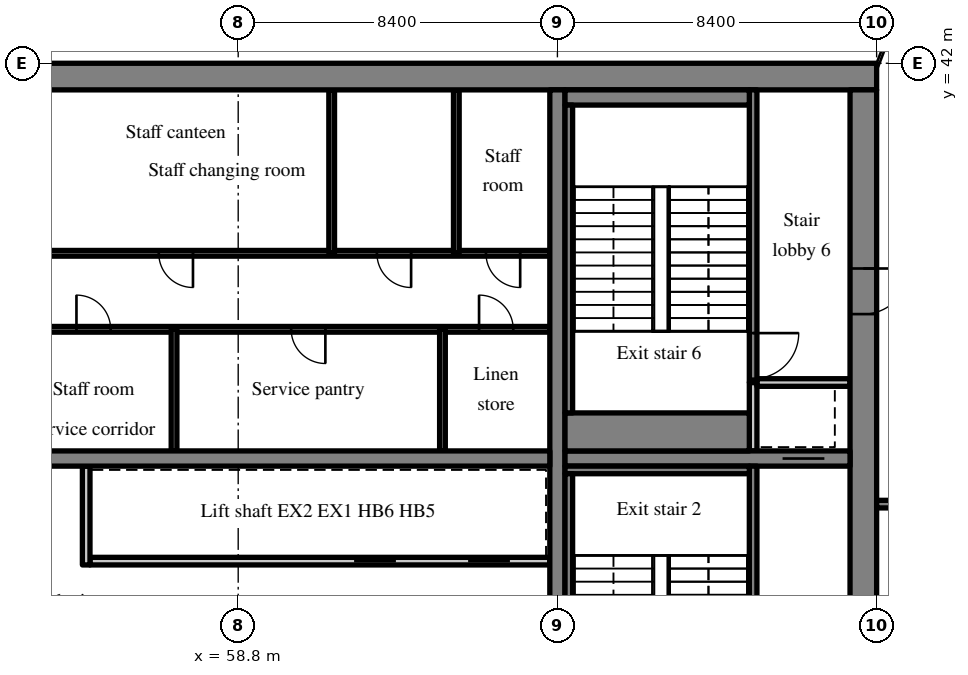
"""IFC4 building model, lengths in metres.
Left out: names, types, materials, properties, quantities, classifications, styles, units other than length and angle.
Written with IfcOpenShell. Run it as: python <this file> out.ifc"""

import sys

from ifc_helpers import new_model, si_unit, direction, frame, frame_2d, origin, place, context, subcontext, project, spatial, rectangle, extrude, source, transform, mapped, element, fill, save


model = new_model("IFC4")
c1 = context("Model", 3, precision=1e-05, world=origin(), true_north=direction((0.0, 1.0)))
c2 = subcontext(c1, "Body", "Model", "MODEL_VIEW")
j1 = project(units=[si_unit("LENGTHUNIT", "METRE"), si_unit("PLANEANGLEUNIT", "RADIAN")], contexts=[c1])
p1 = place(None, origin())
s1 = spatial("IfcSite", under=j1, at=p1, CompositionType="ELEMENT")
p2 = place(p1, origin())
s2 = spatial("IfcBuilding", under=s1, at=p2, CompositionType="ELEMENT")
p3 = place(p2, frame((0.0, 0.0, 170.6)))
s3 = spatial("IfcBuildingStorey", under=s2, at=p3, CompositionType="ELEMENT", Elevation=170.6)
m1 = source(origin(), c2, "Body", "SweptSolid", [
    extrude(rectangle(XDim=50.4, YDim=0.7, at=frame_2d((25.2, 0.0))), origin(), (0.0, 0.0, 1.0), 3.52),
])
p4 = place(p3, frame((25.2, 41.65, 0.0), z_axis=(0.0, 0.0, 1.0), x_axis=(1.0, 0.0, 0.0)))
e1 = element("IfcWall", 1, at=p4, inside=s3, PredefinedType="SHEAR", context=c2, shape_type="MappedRepresentation", body=[
    mapped(m1, transform((0.0, 0.0, 0.0), scale=1.0)),
])
m2 = source(origin(), c2, "Body", "SweptSolid", [
    extrude(rectangle(XDim=18.6, YDim=0.7, at=frame_2d((9.3, 0.0))), origin(), (0.0, 0.0, 1.0), 3.52),
])
p5 = place(p3, frame((75.25, 22.7, 0.0), z_axis=(0.0, 0.0, 1.0), x_axis=(0.0, 1.0, 0.0)))
e2 = element("IfcWall", 2, at=p5, inside=s3, PredefinedType="SHEAR", context=c2, shape_type="MappedRepresentation", body=[
    mapped(m2, transform((0.0, 0.0, 0.0), scale=1.0)),
])
m3 = source(origin(), c2, "Body", "SweptSolid", [
    extrude(rectangle(XDim=1.0, YDim=2.1, at=frame_2d((0.5, 1.05))), frame((0.0, 0.36, 0.0), z_axis=(0.0, -1.0, 0.0), x_axis=(1.0, 0.0, 0.0)), (0.0, 0.0, 1.0), 0.72),
])
p6 = place(p5, frame((2.8, 0.0, 0.0)))
e3 = element("IfcOpeningElement", 3, at=p6, cuts=e2, PredefinedType="OPENING", context=c2, shape_type="MappedRepresentation", body=[
    mapped(m3, transform((0.0, 0.0, 0.0), scale=1.0)),
])
m4 = source(origin(), c2, "Body", "SweptSolid", [
    extrude(rectangle(XDim=1.2, YDim=2.1, at=frame_2d((0.6, 1.05))), frame((0.0, 0.36, 0.0), z_axis=(0.0, -1.0, 0.0), x_axis=(1.0, 0.0, 0.0)), (0.0, 0.0, 1.0), 0.72),
])
p7 = place(p5, frame((12.7, 0.0, 0.0)))
e4 = element("IfcOpeningElement", 4, at=p7, cuts=e2, PredefinedType="OPENING", context=c2, shape_type="MappedRepresentation", body=[
    mapped(m4, transform((0.0, 0.0, 0.0), scale=1.0)),
])
m5 = source(origin(), c2, "Body", "SweptSolid", [
    extrude(rectangle(XDim=18.6, YDim=0.4, at=frame_2d((9.3, 0.0))), origin(), (0.0, 0.0, 1.0), 3.52),
])
p8 = place(p3, frame((67.2, 22.7, 0.0), z_axis=(0.0, 0.0, 1.0), x_axis=(0.0, 1.0, 0.0)))
e5 = element("IfcWall", 5, at=p8, inside=s3, PredefinedType="SHEAR", context=c2, shape_type="MappedRepresentation", body=[
    mapped(m5, transform((0.0, 0.0, 0.0), scale=1.0)),
])
m6 = source(origin(), c2, "Body", "SweptSolid", [
    extrude(rectangle(XDim=16.4, YDim=0.4, at=frame_2d((8.2, 0.0))), origin(), (0.0, 0.0, 1.0), 3.52),
])
p9 = place(p3, frame((50.6, 31.6, 0.0), z_axis=(0.0, 0.0, 1.0), x_axis=(1.0, 0.0, 0.0)))
e6 = element("IfcWall", 6, at=p9, inside=s3, PredefinedType="SHEAR", context=c2, shape_type="MappedRepresentation", body=[
    mapped(m6, transform((0.0, 0.0, 0.0), scale=1.0)),
])
m7 = source(origin(), c2, "Body", "SweptSolid", [
    extrude(rectangle(XDim=1.0, YDim=2.1, at=frame_2d((0.5, 1.05))), frame((0.0, 0.21, 0.0), z_axis=(0.0, -1.0, 0.0), x_axis=(1.0, 0.0, 0.0)), (0.0, 0.0, 1.0), 0.42),
])
p10 = place(p9, frame((0.6, 0.0, 0.0)))
e7 = element("IfcOpeningElement", 7, at=p10, cuts=e6, PredefinedType="OPENING", context=c2, shape_type="MappedRepresentation", body=[
    mapped(m7, transform((0.0, 0.0, 0.0), scale=1.0)),
])
m8 = source(origin(), c2, "Body", "SweptSolid", [
    extrude(rectangle(XDim=7.5, YDim=0.4, at=frame_2d((3.75, 0.0))), origin(), (0.0, 0.0, 1.0), 3.52),
])
p11 = place(p3, frame((67.4, 31.6, 0.0), z_axis=(0.0, 0.0, 1.0), x_axis=(1.0, 0.0, 0.0)))
e8 = element("IfcWall", 8, at=p11, inside=s3, PredefinedType="SHEAR", context=c2, shape_type="MappedRepresentation", body=[
    mapped(m8, transform((0.0, 0.0, 0.0), scale=1.0)),
])
m9 = source(origin(), c2, "Body", "SweptSolid", [
    extrude(rectangle(XDim=1.1, YDim=2.1, at=frame_2d((0.55, 1.05))), frame((0.0, 0.21, 0.0), z_axis=(0.0, -1.0, 0.0), x_axis=(1.0, 0.0, 0.0)), (0.0, 0.0, 1.0), 0.42),
])
p12 = place(p11, frame((5.725, 0.0, 0.0)))
e9 = element("IfcOpeningElement", 9, at=p12, cuts=e8, PredefinedType="OPENING", context=c2, shape_type="MappedRepresentation", body=[
    mapped(m9, transform((0.0, 0.0, 0.0), scale=1.0)),
])
m10 = source(origin(), c2, "Body", "SweptSolid", [
    extrude(rectangle(XDim=12.1, YDim=0.2, at=frame_2d((6.05, 0.0))), origin(), (0.0, 0.0, 1.0), 3.52),
])
p13 = place(p3, frame((67.0, 28.9, 0.0), z_axis=(0.0, 0.0, 1.0), x_axis=(-1.0, 0.0, 0.0)))
e10 = element("IfcWall", 10, at=p13, inside=s3, PredefinedType="SOLIDWALL", context=c2, shape_type="MappedRepresentation", body=[
    mapped(m10, transform((0.0, 0.0, 0.0), scale=1.0)),
])
m11 = source(origin(), c2, "Body", "SweptSolid", [
    extrude(rectangle(XDim=1.1, YDim=2.1, at=frame_2d((0.55, 1.05))), frame((0.0, 0.11, 0.0), z_axis=(0.0, -1.0, 0.0), x_axis=(1.0, 0.0, 0.0)), (0.0, 0.0, 1.0), 0.22),
])
p14 = place(p13, frame((1.05, 0.0, 0.0)))
e11 = element("IfcOpeningElement", 11, at=p14, cuts=e10, PredefinedType="OPENING", context=c2, shape_type="MappedRepresentation", body=[
    mapped(m11, transform((0.0, 0.0, 0.0), scale=1.0)),
])
p15 = place(p13, frame((4.05, 0.0, 0.0)))
e12 = element("IfcOpeningElement", 12, at=p15, cuts=e10, PredefinedType="OPENING", context=c2, shape_type="MappedRepresentation", body=[
    mapped(m11, transform((0.0, 0.0, 0.0), scale=1.0)),
])
m12 = source(origin(), c2, "Body", "SweptSolid", [
    extrude(rectangle(XDim=2.6, YDim=0.2, at=frame_2d((1.3, 0.0))), origin(), (0.0, 0.0, 1.0), 3.52),
])
p16 = place(p3, frame((54.8, 28.8, 0.0), z_axis=(0.0, 0.0, 1.0), x_axis=(0.0, 1.0, 0.0)))
e13 = element("IfcWall", 13, at=p16, inside=s3, PredefinedType="SOLIDWALL", context=c2, shape_type="MappedRepresentation", body=[
    mapped(m12, transform((0.0, 0.0, 0.0), scale=1.0)),
])
m13 = source(origin(), c2, "Body", "SweptSolid", [
    extrude(rectangle(XDim=14.2, YDim=0.15, at=frame_2d((7.1, 0.0))), origin(), (0.0, 0.0, 1.0), 3.52),
])
p17 = place(p3, frame((67.0, 35.0, 0.0), z_axis=(0.0, 0.0, 1.0), x_axis=(-1.0, 0.0, 0.0)))
e14 = element("IfcWall", 14, at=p17, inside=s3, PredefinedType="PARTITIONING", context=c2, shape_type="MappedRepresentation", body=[
    mapped(m13, transform((0.0, 0.0, 0.0), scale=1.0)),
])
m14 = source(origin(), c2, "Body", "SweptSolid", [
    extrude(rectangle(XDim=0.9, YDim=2.1, at=frame_2d((0.45, 1.05))), frame((0.0, 0.085, 0.0), z_axis=(0.0, -1.0, 0.0), x_axis=(1.0, 0.0, 0.0)), (0.0, 0.0, 1.0), 0.17),
])
p18 = place(p17, frame((0.962, 0.0, 0.0)))
e15 = element("IfcOpeningElement", 15, at=p18, cuts=e14, PredefinedType="OPENING", context=c2, shape_type="MappedRepresentation", body=[
    mapped(m14, transform((0.0, 0.0, 0.0), scale=1.0)),
])
p19 = place(p17, frame((5.906, 0.0, 0.0)))
e16 = element("IfcOpeningElement", 16, at=p19, cuts=e14, PredefinedType="OPENING", context=c2, shape_type="MappedRepresentation", body=[
    mapped(m14, transform((0.0, 0.0, 0.0), scale=1.0)),
])
p20 = place(p17, frame((11.556, 0.0, 0.0)))
e17 = element("IfcOpeningElement", 17, at=p20, cuts=e14, PredefinedType="OPENING", context=c2, shape_type="MappedRepresentation", body=[
    mapped(m14, transform((0.0, 0.0, 0.0), scale=1.0)),
])
m15 = source(origin(), c2, "Body", "SweptSolid", [
    extrude(rectangle(XDim=16.4, YDim=0.15, at=frame_2d((8.2, 0.0))), origin(), (0.0, 0.0, 1.0), 3.52),
])
p21 = place(p3, frame((67.0, 37.0, 0.0), z_axis=(0.0, 0.0, 1.0), x_axis=(-1.0, 0.0, 0.0)))
e18 = element("IfcWall", 18, at=p21, inside=s3, PredefinedType="PARTITIONING", context=c2, shape_type="MappedRepresentation", body=[
    mapped(m15, transform((0.0, 0.0, 0.0), scale=1.0)),
])
p22 = place(p21, frame((0.78, 0.0, 0.0)))
e19 = element("IfcOpeningElement", 19, at=p22, cuts=e18, PredefinedType="OPENING", context=c2, shape_type="MappedRepresentation", body=[
    mapped(m14, transform((0.0, 0.0, 0.0), scale=1.0)),
])
p23 = place(p21, frame((3.65, 0.0, 0.0)))
e20 = element("IfcOpeningElement", 20, at=p23, cuts=e18, PredefinedType="OPENING", context=c2, shape_type="MappedRepresentation", body=[
    mapped(m14, transform((0.0, 0.0, 0.0), scale=1.0)),
])
p24 = place(p21, frame((9.39, 0.0, 0.0)))
e21 = element("IfcOpeningElement", 21, at=p24, cuts=e18, PredefinedType="OPENING", context=c2, shape_type="MappedRepresentation", body=[
    mapped(m14, transform((0.0, 0.0, 0.0), scale=1.0)),
])
p25 = place(p21, frame((14.72, 0.0, 0.0)))
e22 = element("IfcOpeningElement", 22, at=p25, cuts=e18, PredefinedType="OPENING", context=c2, shape_type="MappedRepresentation", body=[
    mapped(m14, transform((0.0, 0.0, 0.0), scale=1.0)),
])
m16 = source(origin(), c2, "Body", "SweptSolid", [
    extrude(rectangle(XDim=3.2, YDim=0.15, at=frame_2d((1.6, 0.0))), origin(), (0.0, 0.0, 1.0), 3.52),
])
for number, where, z_axis, x_axis in (
    (23, (64.175, 31.8, 0.0), (0.0, 0.0, 1.0), (0.0, 1.0, 0.0)),
    (24, (57.112, 31.8, 0.0), (0.0, 0.0, 1.0), (0.0, 1.0, 0.0)),
):
    element("IfcWall", number, at=place(p3, frame(where, z_axis=z_axis, x_axis=x_axis)), inside=s3, PredefinedType="PARTITIONING", context=c2, shape_type="MappedRepresentation", body=[
        mapped(m16, transform((0.0, 0.0, 0.0), scale=1.0)),
    ])
m17 = source(origin(), c2, "Body", "SweptSolid", [
    extrude(rectangle(XDim=4.3, YDim=0.15, at=frame_2d((2.15, 0.0))), origin(), (0.0, 0.0, 1.0), 3.52),
])
for number, where, z_axis, x_axis in (
    (25, (64.54, 37.0, 0.0), (0.0, 0.0, 1.0), (0.0, 1.0, 0.0)),
    (26, (61.26, 37.0, 0.0), (0.0, 0.0, 1.0), (0.0, 1.0, 0.0)),
):
    element("IfcWall", number, at=place(p3, frame(where, z_axis=z_axis, x_axis=x_axis)), inside=s3, PredefinedType="PARTITIONING", context=c2, shape_type="MappedRepresentation", body=[
        mapped(m17, transform((0.0, 0.0, 0.0), scale=1.0)),
    ])
m18 = source(origin(), c2, "Body", "SweptSolid", [
    extrude(rectangle(XDim=8.7, YDim=0.2, at=frame_2d((4.35, 0.0))), origin(), (0.0, 0.0, 1.0), 3.52),
])
p26 = place(p3, frame((72.35, 22.7, 0.0), z_axis=(0.0, 0.0, 1.0), x_axis=(0.0, 1.0, 0.0)))
e27 = element("IfcWall", 27, at=p26, inside=s3, PredefinedType="SOLIDWALL", context=c2, shape_type="MappedRepresentation", body=[
    mapped(m18, transform((0.0, 0.0, 0.0), scale=1.0)),
])
m19 = source(origin(), c2, "Body", "SweptSolid", [
    extrude(rectangle(XDim=1.2, YDim=2.1, at=frame_2d((0.6, 1.05))), frame((0.0, 0.11, 0.0), z_axis=(0.0, -1.0, 0.0), x_axis=(1.0, 0.0, 0.0)), (0.0, 0.0, 1.0), 0.22),
])
p27 = place(p26, frame((0.9, 0.0, 0.0)))
e28 = element("IfcOpeningElement", 28, at=p27, cuts=e27, PredefinedType="OPENING", context=c2, shape_type="MappedRepresentation", body=[
    mapped(m19, transform((0.0, 0.0, 0.0), scale=1.0)),
])
m20 = source(origin(), c2, "Body", "SweptSolid", [
    extrude(rectangle(XDim=1.8, YDim=0.2, at=frame_2d((0.9, 0.0))), origin(), (0.0, 0.0, 1.0), 3.52),
])
p28 = place(p3, frame((72.35, 31.8, 0.0), z_axis=(0.0, 0.0, 1.0), x_axis=(0.0, 1.0, 0.0)))
e29 = element("IfcWall", 29, at=p28, inside=s3, PredefinedType="SOLIDWALL", context=c2, shape_type="MappedRepresentation", body=[
    mapped(m20, transform((0.0, 0.0, 0.0), scale=1.0)),
])
m21 = source(origin(), c2, "Body", "SweptSolid", [
    extrude(rectangle(XDim=2.45, YDim=0.2, at=frame_2d((1.225, 0.0))), origin(), (0.0, 0.0, 1.0), 3.52),
])
p29 = place(p3, frame((72.45, 33.6, 0.0), z_axis=(0.0, 0.0, 1.0), x_axis=(1.0, 0.0, 0.0)))
e30 = element("IfcWall", 30, at=p29, inside=s3, PredefinedType="SOLIDWALL", context=c2, shape_type="MappedRepresentation", body=[
    mapped(m21, transform((0.0, 0.0, 0.0), scale=1.0)),
])
m22 = source(origin(), c2, "Body", "SweptSolid", [
    extrude(rectangle(XDim=7.7, YDim=0.2, at=frame_2d((3.85, 0.0))), origin(), (0.0, 0.0, 1.0), 3.52),
])
p30 = place(p3, frame((72.35, 33.6, 0.0), z_axis=(0.0, 0.0, 1.0), x_axis=(0.0, 1.0, 0.0)))
e31 = element("IfcWall", 31, at=p30, inside=s3, PredefinedType="SOLIDWALL", context=c2, shape_type="MappedRepresentation", body=[
    mapped(m22, transform((0.0, 0.0, 0.0), scale=1.0)),
])
p31 = place(p30, frame((0.1, 0.0, 0.0)))
e32 = element("IfcOpeningElement", 32, at=p31, cuts=e31, PredefinedType="OPENING", context=c2, shape_type="MappedRepresentation", body=[
    mapped(m19, transform((0.0, 0.0, 0.0), scale=1.0)),
])
m23 = source(origin(), c2, "Body", "SweptSolid", [
    extrude(rectangle(XDim=8.25, YDim=0.2, at=frame_2d((4.125, 0.0))), origin(), (0.0, 0.0, 1.0), 3.52),
])
p32 = place(p3, frame((83.85, 30.4, 0.0), z_axis=(0.0, 0.0, 1.0), x_axis=(-1.0, 0.0, 0.0)))
e33 = element("IfcWall", 33, at=p32, inside=s3, PredefinedType="SOLIDWALL", context=c2, shape_type="MappedRepresentation", body=[
    mapped(m23, transform((0.0, 0.0, 0.0), scale=1.0)),
])
m24 = source(origin(), c2, "Body", "SweptSolid", [
    extrude(rectangle(XDim=1.0, YDim=2.1, at=frame_2d((0.5, 1.05))), frame((0.0, 0.11, 0.0), z_axis=(0.0, -1.0, 0.0), x_axis=(1.0, 0.0, 0.0)), (0.0, 0.0, 1.0), 0.22),
])
p33 = place(p32, frame((6.15, 0.0, 0.0)))
e34 = element("IfcOpeningElement", 34, at=p33, cuts=e33, PredefinedType="OPENING", context=c2, shape_type="MappedRepresentation", body=[
    mapped(m24, transform((0.0, 0.0, 0.0), scale=1.0)),
])
m25 = source(origin(), c2, "Body", "SweptSolid", [
    extrude(rectangle(XDim=4.85, YDim=0.2, at=frame_2d((2.425, 0.0))), origin(), (0.0, 0.0, 1.0), 3.52),
])
p34 = place(p3, frame((67.4, 31.3, 0.0), z_axis=(0.0, 0.0, 1.0), x_axis=(1.0, 0.0, 0.0)))
e35 = element("IfcWall", 35, at=p34, inside=s3, PredefinedType="SOLIDWALL", context=c2, shape_type="MappedRepresentation", body=[
    mapped(m25, transform((0.0, 0.0, 0.0), scale=1.0)),
])
m26 = source(origin(), c2, "Body", "SweptSolid", [
    extrude(rectangle(XDim=8.1, YDim=0.2, at=frame_2d((4.05, 0.0))), origin(), (0.0, 0.0, 1.0), 3.52),
])
p35 = place(p3, frame((67.5, 23.1, 0.0), z_axis=(0.0, 0.0, 1.0), x_axis=(0.0, 1.0, 0.0)))
e36 = element("IfcWall", 36, at=p35, inside=s3, PredefinedType="SOLIDWALL", context=c2, shape_type="MappedRepresentation", body=[
    mapped(m26, transform((0.0, 0.0, 0.0), scale=1.0)),
])
m27 = source(origin(), c2, "Body", "SweptSolid", [
    extrude(rectangle(XDim=4.85, YDim=0.4, at=frame_2d((2.425, 0.0))), origin(), (0.0, 0.0, 1.0), 3.52),
])
p36 = place(p3, frame((67.4, 41.1, 0.0), z_axis=(0.0, 0.0, 1.0), x_axis=(1.0, 0.0, 0.0)))
e37 = element("IfcWall", 37, at=p36, inside=s3, PredefinedType="SOLIDWALL", context=c2, shape_type="MappedRepresentation", body=[
    mapped(m27, transform((0.0, 0.0, 0.0), scale=1.0)),
])
m28 = source(origin(), c2, "Body", "SweptSolid", [
    extrude(rectangle(XDim=4.85, YDim=1.0, at=frame_2d((2.425, 0.0))), origin(), (0.0, 0.0, 1.0), 3.52),
])
p37 = place(p3, frame((67.4, 32.3, 0.0), z_axis=(0.0, 0.0, 1.0), x_axis=(1.0, 0.0, 0.0)))
e38 = element("IfcWall", 38, at=p37, inside=s3, PredefinedType="SOLIDWALL", context=c2, shape_type="MappedRepresentation", body=[
    mapped(m28, transform((0.0, 0.0, 0.0), scale=1.0)),
])
p38 = place(p3, frame((67.5, 32.8, 0.0), z_axis=(0.0, 0.0, 1.0), x_axis=(0.0, 1.0, 0.0)))
e39 = element("IfcWall", 39, at=p38, inside=s3, PredefinedType="SOLIDWALL", context=c2, shape_type="MappedRepresentation", body=[
    mapped(m26, transform((0.0, 0.0, 0.0), scale=1.0)),
])
m29 = source(origin(), c2, "Body", "SweptSolid", [
    extrude(rectangle(XDim=1.1, YDim=2.1, at=frame_2d((0.55, 1.05))), frame((0.0, 0.025, 0.0), z_axis=(0.0, -1.0, 0.0), x_axis=(1.0, 0.0, 0.0)), (0.0, 0.0, 1.0), 0.05),
])
p39 = place(p14, origin())
e40 = element("IfcDoor", 40, at=p39, inside=s3, OperationType="SLIDING_TO_RIGHT", PredefinedType="DOOR", context=c2, shape_type="MappedRepresentation", body=[
    mapped(m29, transform((0.0, 0.0, 0.0), scale=1.0)),
])
fill(e11, e40)
p40 = place(p15, origin())
e41 = element("IfcDoor", 41, at=p40, inside=s3, OperationType="SLIDING_TO_LEFT", PredefinedType="DOOR", context=c2, shape_type="MappedRepresentation", body=[
    mapped(m29, transform((0.0, 0.0, 0.0), scale=1.0)),
])
fill(e12, e41)
m30 = source(origin(), c2, "Body", "SweptSolid", [
    extrude(rectangle(XDim=0.9, YDim=2.1, at=frame_2d((0.45, 1.05))), frame((0.0, 0.025, 0.0), z_axis=(0.0, -1.0, 0.0), x_axis=(1.0, 0.0, 0.0)), (0.0, 0.0, 1.0), 0.05),
])
p41 = place(p18, origin())
e42 = element("IfcDoor", 42, at=p41, inside=s3, OperationType="SINGLE_SWING_RIGHT", PredefinedType="DOOR", context=c2, shape_type="MappedRepresentation", body=[
    mapped(m30, transform((0.0, 0.0, 0.0), scale=1.0)),
])
fill(e15, e42)
p42 = place(p19, origin())
e43 = element("IfcDoor", 43, at=p42, inside=s3, OperationType="SINGLE_SWING_LEFT", PredefinedType="DOOR", context=c2, shape_type="MappedRepresentation", body=[
    mapped(m30, transform((0.0, 0.0, 0.0), scale=1.0)),
])
fill(e16, e43)
p43 = place(p20, origin())
e44 = element("IfcDoor", 44, at=p43, inside=s3, OperationType="SINGLE_SWING_RIGHT", PredefinedType="DOOR", context=c2, shape_type="MappedRepresentation", body=[
    mapped(m30, transform((0.0, 0.0, 0.0), scale=1.0)),
])
fill(e17, e44)
p44 = place(p22, origin())
e45 = element("IfcDoor", 45, at=p44, inside=s3, OperationType="SINGLE_SWING_LEFT", PredefinedType="DOOR", context=c2, shape_type="MappedRepresentation", body=[
    mapped(m30, transform((0.0, 0.0, 0.0), scale=1.0)),
])
fill(e19, e45)
p45 = place(p23, origin())
e46 = element("IfcDoor", 46, at=p45, inside=s3, OperationType="SINGLE_SWING_LEFT", PredefinedType="DOOR", context=c2, shape_type="MappedRepresentation", body=[
    mapped(m30, transform((0.0, 0.0, 0.0), scale=1.0)),
])
fill(e20, e46)
p46 = place(p24, origin())
e47 = element("IfcDoor", 47, at=p46, inside=s3, OperationType="SINGLE_SWING_LEFT", PredefinedType="DOOR", context=c2, shape_type="MappedRepresentation", body=[
    mapped(m30, transform((0.0, 0.0, 0.0), scale=1.0)),
])
fill(e21, e47)
p47 = place(p12, origin())
e48 = element("IfcDoor", 48, at=p47, inside=s3, OperationType="SLIDING_TO_LEFT", PredefinedType="DOOR", context=c2, shape_type="MappedRepresentation", body=[
    mapped(m29, transform((0.0, 0.0, 0.0), scale=1.0)),
])
fill(e9, e48)
m31 = source(origin(), c2, "Body", "SweptSolid", [
    extrude(rectangle(XDim=1.2, YDim=2.1, at=frame_2d((0.6, 1.05))), frame((0.0, 0.025, 0.0), z_axis=(0.0, -1.0, 0.0), x_axis=(1.0, 0.0, 0.0)), (0.0, 0.0, 1.0), 0.05),
])
p48 = place(p31, origin())
e49 = element("IfcDoor", 49, at=p48, inside=s3, OperationType="SINGLE_SWING_RIGHT", PredefinedType="DOOR", context=c2, shape_type="MappedRepresentation", body=[
    mapped(m31, transform((0.0, 0.0, 0.0), scale=1.0)),
])
fill(e32, e49)
p49 = place(p7, origin())
e50 = element("IfcDoor", 50, at=p49, inside=s3, OperationType="SINGLE_SWING_RIGHT", PredefinedType="DOOR", context=c2, shape_type="MappedRepresentation", body=[
    mapped(m31, transform((0.0, 0.0, 0.0), scale=1.0)),
])
fill(e4, e50)
save(model, sys.argv[1])
